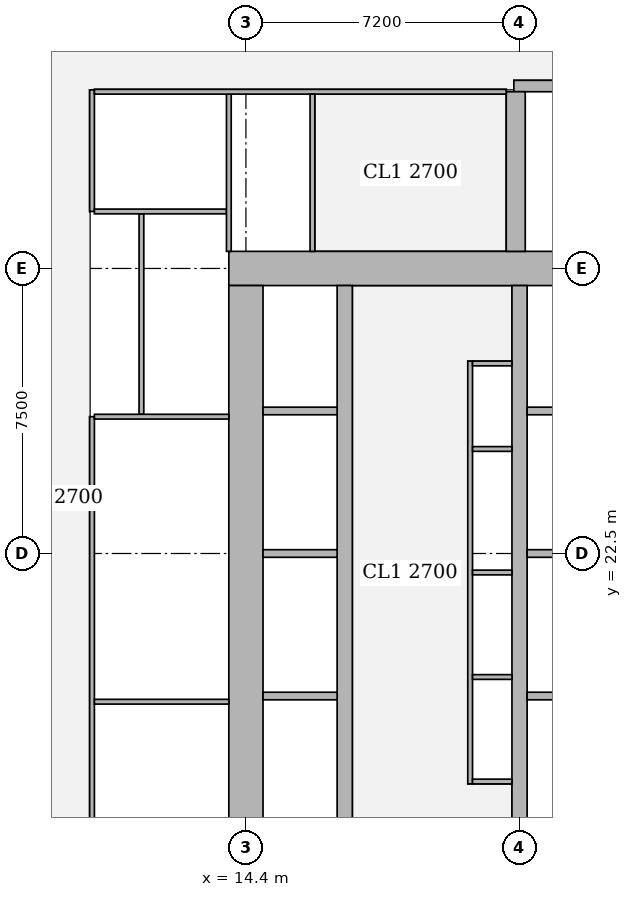
"""IFC4 building model, lengths in metres.
Left out: names, types, materials, properties, quantities, classifications, styles, units other than length and angle.
Written with IfcOpenShell. Run it as: python <this file> out.ifc"""

import sys

from ifc_helpers import new_model, si_unit, direction, frame, frame_2d, origin, place, context, subcontext, project, spatial, rectangle, extrude, element, fill, save


model = new_model("IFC4")
c1 = context("Model", 3, precision=1e-05, world=origin(), true_north=direction((0.0, 1.0)))
c2 = subcontext(c1, "Body", "Model", "MODEL_VIEW")
j1 = project(units=[si_unit("LENGTHUNIT", "METRE"), si_unit("PLANEANGLEUNIT", "RADIAN")], contexts=[c1])
p1 = place(None, origin())
s1 = spatial("IfcSite", under=j1, at=p1, CompositionType="ELEMENT")
p2 = place(p1, origin())
s2 = spatial("IfcBuilding", under=s1, at=p2, CompositionType="ELEMENT")
p3 = place(p2, frame((0.0, 0.0, 20.0)))
s3 = spatial("IfcBuildingStorey", under=s2, at=p3, CompositionType="ELEMENT", Elevation=20.0)
p4 = place(p3, frame((13.95, 30.0, 0.0), z_axis=(0.0, 0.0, 1.0), x_axis=(1.0, 0.0, 0.0)))
e1 = element("IfcWall", 1, at=p4, inside=s3, PredefinedType="SHEAR", context=c2, shape_type="SweptSolid", body=[
    extrude(rectangle(XDim=15.3, YDim=0.9, at=frame_2d((7.65, 0.0))), origin(), (0.0, 0.0, 1.0), 3.75),
])
p5 = place(p4, frame((4.45, 0.0, 0.0)))
e2 = element("IfcOpeningElement", 2, at=p5, cuts=e1, PredefinedType="OPENING", context=c2, shape_type="SweptSolid", body=[
    extrude(rectangle(XDim=1.8, YDim=2.1, at=frame_2d((0.9, 1.05))), frame((0.0, 0.46, 0.0), z_axis=(0.0, -1.0, 0.0), x_axis=(1.0, 0.0, 0.0)), (0.0, 0.0, 1.0), 0.92),
])
p6 = place(p4, frame((10.7, 0.0, 0.0)))
e3 = element("IfcOpeningElement", 3, at=p6, cuts=e1, PredefinedType="OPENING", context=c2, shape_type="SweptSolid", body=[
    extrude(rectangle(XDim=1.1, YDim=2.1, at=frame_2d((0.55, 1.05))), frame((0.0, 0.46, 0.0), z_axis=(0.0, -1.0, 0.0), x_axis=(1.0, 0.0, 0.0)), (0.0, 0.0, 1.0), 0.92),
])
p7 = place(p3, frame((14.4, 15.45, 0.0), z_axis=(0.0, 0.0, 1.0), x_axis=(0.0, 1.0, 0.0)))
e4 = element("IfcWall", 4, at=p7, inside=s3, PredefinedType="SHEAR", context=c2, shape_type="SweptSolid", body=[
    extrude(rectangle(XDim=14.1, YDim=0.9, at=frame_2d((7.05, 0.0))), origin(), (0.0, 0.0, 1.0), 3.75),
])
p8 = place(p3, frame((17.0, 15.45, 0.0), z_axis=(0.0, 0.0, 1.0), x_axis=(0.0, 1.0, 0.0)))
e5 = element("IfcWall", 5, at=p8, inside=s3, PredefinedType="SHEAR", context=c2, shape_type="SweptSolid", body=[
    extrude(rectangle(XDim=14.1, YDim=0.4, at=frame_2d((7.05, 0.0))), origin(), (0.0, 0.0, 1.0), 3.75),
])
p9 = place(p8, frame((0.875, 0.0, 0.0)))
e6 = element("IfcOpeningElement", 6, at=p9, cuts=e5, PredefinedType="OPENING", context=c2, shape_type="SweptSolid", body=[
    extrude(rectangle(XDim=1.1, YDim=2.1, at=frame_2d((0.55, 1.05))), frame((0.0, 0.21, 0.0), z_axis=(0.0, -1.0, 0.0), x_axis=(1.0, 0.0, 0.0)), (0.0, 0.0, 1.0), 0.42),
])
p10 = place(p8, frame((4.625, 0.0, 0.0)))
e7 = element("IfcOpeningElement", 7, at=p10, cuts=e5, PredefinedType="OPENING", context=c2, shape_type="SweptSolid", body=[
    extrude(rectangle(XDim=1.1, YDim=2.1, at=frame_2d((0.55, 1.05))), frame((0.0, 0.21, 0.0), z_axis=(0.0, -1.0, 0.0), x_axis=(1.0, 0.0, 0.0)), (0.0, 0.0, 1.0), 0.42),
])
p11 = place(p8, frame((8.375, 0.0, 0.0)))
e8 = element("IfcOpeningElement", 8, at=p11, cuts=e5, PredefinedType="OPENING", context=c2, shape_type="SweptSolid", body=[
    extrude(rectangle(XDim=1.1, YDim=2.1, at=frame_2d((0.55, 1.05))), frame((0.0, 0.21, 0.0), z_axis=(0.0, -1.0, 0.0), x_axis=(1.0, 0.0, 0.0)), (0.0, 0.0, 1.0), 0.42),
])
p12 = place(p8, frame((12.125, 0.0, 0.0)))
e9 = element("IfcOpeningElement", 9, at=p12, cuts=e5, PredefinedType="OPENING", context=c2, shape_type="SweptSolid", body=[
    extrude(rectangle(XDim=1.1, YDim=2.1, at=frame_2d((0.55, 1.05))), frame((0.0, 0.21, 0.0), z_axis=(0.0, -1.0, 0.0), x_axis=(1.0, 0.0, 0.0)), (0.0, 0.0, 1.0), 0.42),
])
p13 = place(p3, frame((21.6, 15.45, 0.0), z_axis=(0.0, 0.0, 1.0), x_axis=(0.0, 1.0, 0.0)))
e10 = element("IfcWall", 10, at=p13, inside=s3, PredefinedType="SHEAR", context=c2, shape_type="SweptSolid", body=[
    extrude(rectangle(XDim=14.1, YDim=0.4, at=frame_2d((7.05, 0.0))), origin(), (0.0, 0.0, 1.0), 3.75),
])
p14 = place(p3, frame((21.45, 34.8, 0.0), z_axis=(0.0, 0.0, 1.0), x_axis=(1.0, 0.0, 0.0)))
e11 = element("IfcWall", 11, at=p14, inside=s3, PredefinedType="SHEAR", context=c2, shape_type="SweptSolid", body=[
    extrude(rectangle(XDim=7.5, YDim=0.3, at=frame_2d((3.75, 0.0))), origin(), (0.0, 0.0, 1.0), 3.75),
])
p15 = place(p14, frame((0.5, 0.0, 0.0)))
e12 = element("IfcOpeningElement", 12, at=p15, cuts=e11, PredefinedType="OPENING", context=c2, shape_type="SweptSolid", body=[
    extrude(rectangle(XDim=1.1, YDim=2.1, at=frame_2d((0.55, 1.05))), frame((0.0, 0.16, 0.0), z_axis=(0.0, -1.0, 0.0), x_axis=(1.0, 0.0, 0.0)), (0.0, 0.0, 1.0), 0.32),
])
p16 = place(p3, frame((21.5, 30.45, 0.0), z_axis=(0.0, 0.0, 1.0), x_axis=(0.0, 1.0, 0.0)))
e13 = element("IfcWall", 13, at=p16, inside=s3, PredefinedType="SHEAR", context=c2, shape_type="SweptSolid", body=[
    extrude(rectangle(XDim=4.2, YDim=0.5, at=frame_2d((2.1, 0.0))), origin(), (0.0, 0.0, 1.0), 3.75),
])
p17 = place(p3, frame((10.35, 10.3, 0.0), z_axis=(0.0, 0.0, 1.0), x_axis=(0.0, 1.0, 0.0)))
e14 = element("IfcWall", 14, at=p17, inside=s3, PredefinedType="PARTITIONING", context=c2, shape_type="SweptSolid", body=[
    extrude(rectangle(XDim=15.8, YDim=0.125, at=frame_2d((7.9, 0.0))), origin(), (0.0, 0.0, 1.0), 3.5),
])
p18 = place(p17, frame((1.55, 0.0, 0.0)))
e15 = element("IfcOpeningElement", 15, at=p18, cuts=e14, PredefinedType="OPENING", context=c2, shape_type="SweptSolid", body=[
    extrude(rectangle(XDim=1.0, YDim=2.1, at=frame_2d((0.5, 1.05))), frame((0.0, 0.073, 0.0), z_axis=(0.0, -1.0, 0.0), x_axis=(1.0, 0.0, 0.0)), (0.0, 0.0, 1.0), 0.145),
])
p19 = place(p17, frame((5.7, 0.0, 0.0)))
e16 = element("IfcOpeningElement", 16, at=p19, cuts=e14, PredefinedType="OPENING", context=c2, shape_type="SweptSolid", body=[
    extrude(rectangle(XDim=1.0, YDim=2.1, at=frame_2d((0.5, 1.05))), frame((0.0, 0.073, 0.0), z_axis=(0.0, -1.0, 0.0), x_axis=(1.0, 0.0, 0.0)), (0.0, 0.0, 1.0), 0.145),
])
p20 = place(p17, frame((11.55, 0.0, 0.0)))
e17 = element("IfcOpeningElement", 17, at=p20, cuts=e14, PredefinedType="OPENING", context=c2, shape_type="SweptSolid", body=[
    extrude(rectangle(XDim=1.0, YDim=2.1, at=frame_2d((0.5, 1.05))), frame((0.0, 0.073, 0.0), z_axis=(0.0, -1.0, 0.0), x_axis=(1.0, 0.0, 0.0)), (0.0, 0.0, 1.0), 0.145),
])
p21 = place(p3, frame((10.35, 31.5, 0.0), z_axis=(0.0, 0.0, 1.0), x_axis=(0.0, 1.0, 0.0)))
e18 = element("IfcWall", 18, at=p21, inside=s3, PredefinedType="PARTITIONING", context=c2, shape_type="SweptSolid", body=[
    extrude(rectangle(XDim=3.2, YDim=0.125, at=frame_2d((1.6, 0.0))), origin(), (0.0, 0.0, 1.0), 3.5),
])
p22 = place(p21, frame((1.1, 0.0, 0.0)))
e19 = element("IfcOpeningElement", 19, at=p22, cuts=e18, PredefinedType="OPENING", context=c2, shape_type="SweptSolid", body=[
    extrude(rectangle(XDim=1.0, YDim=2.1, at=frame_2d((0.5, 1.05))), frame((0.0, 0.073, 0.0), z_axis=(0.0, -1.0, 0.0), x_axis=(1.0, 0.0, 0.0)), (0.0, 0.0, 1.0), 0.145),
])
p23 = place(p3, frame((11.65, 26.163, 0.0), z_axis=(0.0, 0.0, 1.0), x_axis=(0.0, 1.0, 0.0)))
e20 = element("IfcWall", 20, at=p23, inside=s3, PredefinedType="PARTITIONING", context=c2, shape_type="SweptSolid", body=[
    extrude(rectangle(XDim=5.275, YDim=0.125, at=frame_2d((2.637, 0.0))), origin(), (0.0, 0.0, 1.0), 3.5),
])
p24 = place(p23, frame((2.137, 0.0, 0.0)))
e21 = element("IfcOpeningElement", 21, at=p24, cuts=e20, PredefinedType="OPENING", context=c2, shape_type="SweptSolid", body=[
    extrude(rectangle(XDim=1.0, YDim=2.1, at=frame_2d((0.5, 1.05))), frame((0.0, 0.073, 0.0), z_axis=(0.0, -1.0, 0.0), x_axis=(1.0, 0.0, 0.0)), (0.0, 0.0, 1.0), 0.145),
])
for number, where, z_axis, x_axis in (
    (22, (10.413, 18.6, 0.0), (0.0, 0.0, 1.0), (1.0, 0.0, 0.0)),
    (23, (10.413, 26.1, 0.0), (0.0, 0.0, 1.0), (1.0, 0.0, 0.0)),
):
    element("IfcWall", number, at=place(p3, frame(where, z_axis=z_axis, x_axis=x_axis)), inside=s3, PredefinedType="PARTITIONING", context=c2, shape_type="SweptSolid", body=[
        extrude(rectangle(XDim=3.537, YDim=0.125, at=frame_2d((1.769, 0.0))), origin(), (0.0, 0.0, 1.0), 3.5),
    ])
p25 = place(p3, frame((10.413, 31.5, 0.0), z_axis=(0.0, 0.0, 1.0), x_axis=(1.0, 0.0, 0.0)))
e24 = element("IfcWall", 24, at=p25, inside=s3, PredefinedType="PARTITIONING", context=c2, shape_type="SweptSolid", body=[
    extrude(rectangle(XDim=3.475, YDim=0.125, at=frame_2d((1.737, 0.0))), origin(), (0.0, 0.0, 1.0), 3.5),
])
p26 = place(p3, frame((13.95, 30.45, 0.0), z_axis=(0.0, 0.0, 1.0), x_axis=(0.0, 1.0, 0.0)))
e25 = element("IfcWall", 25, at=p26, inside=s3, PredefinedType="PARTITIONING", context=c2, shape_type="SweptSolid", body=[
    extrude(rectangle(XDim=4.137, YDim=0.125, at=frame_2d((2.068, 0.0))), origin(), (0.0, 0.0, 1.0), 3.5),
])
p27 = place(p3, frame((10.413, 34.65, 0.0), z_axis=(0.0, 0.0, 1.0), x_axis=(1.0, 0.0, 0.0)))
e26 = element("IfcWall", 26, at=p27, inside=s3, PredefinedType="PARTITIONING", context=c2, shape_type="SweptSolid", body=[
    extrude(rectangle(XDim=10.837, YDim=0.125, at=frame_2d((5.418, 0.0))), origin(), (0.0, 0.0, 1.0), 3.5),
])
p28 = place(p27, frame((7.487, 0.0, 0.0)))
e27 = element("IfcOpeningElement", 27, at=p28, cuts=e26, PredefinedType="OPENING", context=c2, shape_type="SweptSolid", body=[
    extrude(rectangle(XDim=1.8, YDim=2.1, at=frame_2d((0.9, 1.05))), frame((0.0, 0.073, 0.0), z_axis=(0.0, -1.0, 0.0), x_axis=(1.0, 0.0, 0.0)), (0.0, 0.0, 1.0), 0.145),
])
p29 = place(p3, frame((16.15, 30.45, 0.0), z_axis=(0.0, 0.0, 1.0), x_axis=(0.0, 1.0, 0.0)))
e28 = element("IfcWall", 28, at=p29, inside=s3, PredefinedType="PARTITIONING", context=c2, shape_type="SweptSolid", body=[
    extrude(rectangle(XDim=4.137, YDim=0.125, at=frame_2d((2.068, 0.0))), origin(), (0.0, 0.0, 1.0), 3.5),
])
p30 = place(p29, frame((1.625, 0.0, 0.0)))
e29 = element("IfcOpeningElement", 29, at=p30, cuts=e28, PredefinedType="OPENING", context=c2, shape_type="SweptSolid", body=[
    extrude(rectangle(XDim=1.0, YDim=2.1, at=frame_2d((0.5, 1.05))), frame((0.0, 0.073, 0.0), z_axis=(0.0, -1.0, 0.0), x_axis=(1.0, 0.0, 0.0)), (0.0, 0.0, 1.0), 0.145),
])
p31 = place(p3, frame((20.3, 16.438, 0.0), z_axis=(0.0, 0.0, 1.0), x_axis=(0.0, 1.0, 0.0)))
e30 = element("IfcWall", 30, at=p31, inside=s3, PredefinedType="PARTITIONING", context=c2, shape_type="SweptSolid", body=[
    extrude(rectangle(XDim=11.124, YDim=0.125, at=frame_2d((5.562, 0.0))), origin(), (0.0, 0.0, 1.0), 3.5),
])
p32 = place(p31, frame((0.937, 0.0, 0.0)))
e31 = element("IfcOpeningElement", 31, at=p32, cuts=e30, PredefinedType="OPENING", context=c2, shape_type="SweptSolid", body=[
    extrude(rectangle(XDim=1.0, YDim=2.1, at=frame_2d((0.5, 1.05))), frame((0.0, 0.073, 0.0), z_axis=(0.0, -1.0, 0.0), x_axis=(1.0, 0.0, 0.0)), (0.0, 0.0, 1.0), 0.145),
])
p33 = place(p31, frame((3.687, 0.0, 0.0)))
e32 = element("IfcOpeningElement", 32, at=p33, cuts=e30, PredefinedType="OPENING", context=c2, shape_type="SweptSolid", body=[
    extrude(rectangle(XDim=1.0, YDim=2.1, at=frame_2d((0.5, 1.05))), frame((0.0, 0.073, 0.0), z_axis=(0.0, -1.0, 0.0), x_axis=(1.0, 0.0, 0.0)), (0.0, 0.0, 1.0), 0.145),
])
p34 = place(p31, frame((6.687, 0.0, 0.0)))
e33 = element("IfcOpeningElement", 33, at=p34, cuts=e30, PredefinedType="OPENING", context=c2, shape_type="SweptSolid", body=[
    extrude(rectangle(XDim=1.0, YDim=2.1, at=frame_2d((0.5, 1.05))), frame((0.0, 0.073, 0.0), z_axis=(0.0, -1.0, 0.0), x_axis=(1.0, 0.0, 0.0)), (0.0, 0.0, 1.0), 0.145),
])
p35 = place(p31, frame((9.437, 0.0, 0.0)))
e34 = element("IfcOpeningElement", 34, at=p35, cuts=e30, PredefinedType="OPENING", context=c2, shape_type="SweptSolid", body=[
    extrude(rectangle(XDim=1.0, YDim=2.1, at=frame_2d((0.5, 1.05))), frame((0.0, 0.073, 0.0), z_axis=(0.0, -1.0, 0.0), x_axis=(1.0, 0.0, 0.0)), (0.0, 0.0, 1.0), 0.145),
])
for number, where, z_axis, x_axis in (
    (35, (20.363, 16.5, 0.0), (0.0, 0.0, 1.0), (1.0, 0.0, 0.0)),
    (36, (20.363, 27.5, 0.0), (0.0, 0.0, 1.0), (1.0, 0.0, 0.0)),
    (37, (20.363, 19.25, 0.0), (0.0, 0.0, 1.0), (1.0, 0.0, 0.0)),
    (38, (20.363, 22.0, 0.0), (0.0, 0.0, 1.0), (1.0, 0.0, 0.0)),
    (39, (20.363, 25.25, 0.0), (0.0, 0.0, 1.0), (1.0, 0.0, 0.0)),
):
    element("IfcWall", number, at=place(p3, frame(where, z_axis=z_axis, x_axis=x_axis)), inside=s3, PredefinedType="PARTITIONING", context=c2, shape_type="SweptSolid", body=[
        extrude(rectangle(XDim=1.037, YDim=0.125, at=frame_2d((0.519, 0.0))), origin(), (0.0, 0.0, 1.0), 3.5),
    ])
p36 = place(p3, frame((14.85, 18.75, 0.0), z_axis=(0.0, 0.0, 1.0), x_axis=(1.0, 0.0, 0.0)))
e40 = element("IfcWall", 40, at=p36, inside=s3, PredefinedType="SOLIDWALL", context=c2, shape_type="SweptSolid", body=[
    extrude(rectangle(XDim=1.95, YDim=0.2, at=frame_2d((0.975, 0.0))), origin(), (0.0, 0.0, 1.0), 3.5),
])
p37 = place(p3, frame((21.8, 18.75, 0.0), z_axis=(0.0, 0.0, 1.0), x_axis=(1.0, 0.0, 0.0)))
e41 = element("IfcWall", 41, at=p37, inside=s3, PredefinedType="SOLIDWALL", context=c2, shape_type="SweptSolid", body=[
    extrude(rectangle(XDim=2.2, YDim=0.2, at=frame_2d((1.1, 0.0))), origin(), (0.0, 0.0, 1.0), 3.5),
])
p38 = place(p3, frame((14.85, 22.5, 0.0), z_axis=(0.0, 0.0, 1.0), x_axis=(1.0, 0.0, 0.0)))
e42 = element("IfcWall", 42, at=p38, inside=s3, PredefinedType="SOLIDWALL", context=c2, shape_type="SweptSolid", body=[
    extrude(rectangle(XDim=1.95, YDim=0.2, at=frame_2d((0.975, 0.0))), origin(), (0.0, 0.0, 1.0), 3.5),
])
p39 = place(p3, frame((21.8, 22.5, 0.0), z_axis=(0.0, 0.0, 1.0), x_axis=(1.0, 0.0, 0.0)))
e43 = element("IfcWall", 43, at=p39, inside=s3, PredefinedType="SOLIDWALL", context=c2, shape_type="SweptSolid", body=[
    extrude(rectangle(XDim=2.2, YDim=0.2, at=frame_2d((1.1, 0.0))), origin(), (0.0, 0.0, 1.0), 3.5),
])
p40 = place(p3, frame((14.85, 26.25, 0.0), z_axis=(0.0, 0.0, 1.0), x_axis=(1.0, 0.0, 0.0)))
e44 = element("IfcWall", 44, at=p40, inside=s3, PredefinedType="SOLIDWALL", context=c2, shape_type="SweptSolid", body=[
    extrude(rectangle(XDim=1.95, YDim=0.2, at=frame_2d((0.975, 0.0))), origin(), (0.0, 0.0, 1.0), 3.5),
])
p41 = place(p3, frame((21.8, 26.25, 0.0), z_axis=(0.0, 0.0, 1.0), x_axis=(1.0, 0.0, 0.0)))
e45 = element("IfcWall", 45, at=p41, inside=s3, PredefinedType="SOLIDWALL", context=c2, shape_type="SweptSolid", body=[
    extrude(rectangle(XDim=2.2, YDim=0.2, at=frame_2d((1.1, 0.0))), origin(), (0.0, 0.0, 1.0), 3.5),
])
p42 = place(p19, origin())
e46 = element("IfcDoor", 46, at=p42, inside=s3, OperationType="SINGLE_SWING_LEFT", PredefinedType="DOOR", context=c2, shape_type="SweptSolid", body=[
    extrude(rectangle(XDim=1.0, YDim=2.1, at=frame_2d((0.5, 1.05))), frame((0.0, 0.025, 0.0), z_axis=(0.0, -1.0, 0.0), x_axis=(1.0, 0.0, 0.0)), (0.0, 0.0, 1.0), 0.05),
])
fill(e16, e46)
p43 = place(p20, origin())
e47 = element("IfcDoor", 47, at=p43, inside=s3, OperationType="SINGLE_SWING_LEFT", PredefinedType="DOOR", context=c2, shape_type="SweptSolid", body=[
    extrude(rectangle(XDim=1.0, YDim=2.1, at=frame_2d((0.5, 1.05))), frame((0.0, 0.025, 0.0), z_axis=(0.0, -1.0, 0.0), x_axis=(1.0, 0.0, 0.0)), (0.0, 0.0, 1.0), 0.05),
])
fill(e17, e47)
p44 = place(p24, origin())
e48 = element("IfcDoor", 48, at=p44, inside=s3, OperationType="SINGLE_SWING_LEFT", PredefinedType="DOOR", context=c2, shape_type="SweptSolid", body=[
    extrude(rectangle(XDim=1.0, YDim=2.1, at=frame_2d((0.5, 1.05))), frame((0.0, 0.025, 0.0), z_axis=(0.0, -1.0, 0.0), x_axis=(1.0, 0.0, 0.0)), (0.0, 0.0, 1.0), 0.05),
])
fill(e21, e48)
p45 = place(p22, origin())
e49 = element("IfcDoor", 49, at=p45, inside=s3, OperationType="SINGLE_SWING_RIGHT", PredefinedType="DOOR", context=c2, shape_type="SweptSolid", body=[
    extrude(rectangle(XDim=1.0, YDim=2.1, at=frame_2d((0.5, 1.05))), frame((0.0, 0.025, 0.0), z_axis=(0.0, -1.0, 0.0), x_axis=(1.0, 0.0, 0.0)), (0.0, 0.0, 1.0), 0.05),
])
fill(e19, e49)
p46 = place(p30, origin())
e50 = element("IfcDoor", 50, at=p46, inside=s3, OperationType="SINGLE_SWING_RIGHT", PredefinedType="DOOR", context=c2, shape_type="SweptSolid", body=[
    extrude(rectangle(XDim=1.0, YDim=2.1, at=frame_2d((0.5, 1.05))), frame((0.0, 0.025, 0.0), z_axis=(0.0, -1.0, 0.0), x_axis=(1.0, 0.0, 0.0)), (0.0, 0.0, 1.0), 0.05),
])
fill(e29, e50)
p47 = place(p28, origin())
e51 = element("IfcDoor", 51, at=p47, inside=s3, OperationType="DOUBLE_DOOR_SINGLE_SWING", PredefinedType="DOOR", context=c2, shape_type="SweptSolid", body=[
    extrude(rectangle(XDim=1.8, YDim=2.1, at=frame_2d((0.9, 1.05))), frame((0.0, 0.025, 0.0), z_axis=(0.0, -1.0, 0.0), x_axis=(1.0, 0.0, 0.0)), (0.0, 0.0, 1.0), 0.05),
])
fill(e27, e51)
p48 = place(p32, origin())
e52 = element("IfcDoor", 52, at=p48, inside=s3, OperationType="SINGLE_SWING_RIGHT", PredefinedType="DOOR", context=c2, shape_type="SweptSolid", body=[
    extrude(rectangle(XDim=1.0, YDim=2.1, at=frame_2d((0.5, 1.05))), frame((0.0, 0.025, 0.0), z_axis=(0.0, -1.0, 0.0), x_axis=(1.0, 0.0, 0.0)), (0.0, 0.0, 1.0), 0.05),
])
fill(e31, e52)
p49 = place(p33, origin())
e53 = element("IfcDoor", 53, at=p49, inside=s3, OperationType="SINGLE_SWING_LEFT", PredefinedType="DOOR", context=c2, shape_type="SweptSolid", body=[
    extrude(rectangle(XDim=1.0, YDim=2.1, at=frame_2d((0.5, 1.05))), frame((0.0, 0.025, 0.0), z_axis=(0.0, -1.0, 0.0), x_axis=(1.0, 0.0, 0.0)), (0.0, 0.0, 1.0), 0.05),
])
fill(e32, e53)
p50 = place(p34, origin())
e54 = element("IfcDoor", 54, at=p50, inside=s3, OperationType="SINGLE_SWING_LEFT", PredefinedType="DOOR", context=c2, shape_type="SweptSolid", body=[
    extrude(rectangle(XDim=1.0, YDim=2.1, at=frame_2d((0.5, 1.05))), frame((0.0, 0.025, 0.0), z_axis=(0.0, -1.0, 0.0), x_axis=(1.0, 0.0, 0.0)), (0.0, 0.0, 1.0), 0.05),
])
fill(e33, e54)
p51 = place(p35, origin())
e55 = element("IfcDoor", 55, at=p51, inside=s3, OperationType="SINGLE_SWING_LEFT", PredefinedType="DOOR", context=c2, shape_type="SweptSolid", body=[
    extrude(rectangle(XDim=1.0, YDim=2.1, at=frame_2d((0.5, 1.05))), frame((0.0, 0.025, 0.0), z_axis=(0.0, -1.0, 0.0), x_axis=(1.0, 0.0, 0.0)), (0.0, 0.0, 1.0), 0.05),
])
fill(e34, e55)
p52 = place(p5, origin())
e56 = element("IfcDoor", 56, at=p52, inside=s3, OperationType="DOUBLE_DOOR_SINGLE_SWING", PredefinedType="DOOR", context=c2, shape_type="SweptSolid", body=[
    extrude(rectangle(XDim=1.8, YDim=2.1, at=frame_2d((0.9, 1.05))), frame((0.0, 0.025, 0.0), z_axis=(0.0, -1.0, 0.0), x_axis=(1.0, 0.0, 0.0)), (0.0, 0.0, 1.0), 0.05),
])
fill(e2, e56)
p53 = place(p9, origin())
e57 = element("IfcDoor", 57, at=p53, inside=s3, OperationType="DOUBLE_DOOR_SLIDING", PredefinedType="DOOR", context=c2, shape_type="SweptSolid", body=[
    extrude(rectangle(XDim=1.1, YDim=2.1, at=frame_2d((0.55, 1.05))), frame((0.0, 0.025, 0.0), z_axis=(0.0, -1.0, 0.0), x_axis=(1.0, 0.0, 0.0)), (0.0, 0.0, 1.0), 0.05),
])
fill(e6, e57)
p54 = place(p10, origin())
e58 = element("IfcDoor", 58, at=p54, inside=s3, OperationType="DOUBLE_DOOR_SLIDING", PredefinedType="DOOR", context=c2, shape_type="SweptSolid", body=[
    extrude(rectangle(XDim=1.1, YDim=2.1, at=frame_2d((0.55, 1.05))), frame((0.0, 0.025, 0.0), z_axis=(0.0, -1.0, 0.0), x_axis=(1.0, 0.0, 0.0)), (0.0, 0.0, 1.0), 0.05),
])
fill(e7, e58)
p55 = place(p11, origin())
e59 = element("IfcDoor", 59, at=p55, inside=s3, OperationType="DOUBLE_DOOR_SLIDING", PredefinedType="DOOR", context=c2, shape_type="SweptSolid", body=[
    extrude(rectangle(XDim=1.1, YDim=2.1, at=frame_2d((0.55, 1.05))), frame((0.0, 0.025, 0.0), z_axis=(0.0, -1.0, 0.0), x_axis=(1.0, 0.0, 0.0)), (0.0, 0.0, 1.0), 0.05),
])
fill(e8, e59)
p56 = place(p12, origin())
e60 = element("IfcDoor", 60, at=p56, inside=s3, OperationType="DOUBLE_DOOR_SLIDING", PredefinedType="DOOR", context=c2, shape_type="SweptSolid", body=[
    extrude(rectangle(XDim=1.1, YDim=2.1, at=frame_2d((0.55, 1.05))), frame((0.0, 0.025, 0.0), z_axis=(0.0, -1.0, 0.0), x_axis=(1.0, 0.0, 0.0)), (0.0, 0.0, 1.0), 0.05),
])
fill(e9, e60)
p57 = place(p15, origin())
e61 = element("IfcDoor", 61, at=p57, inside=s3, OperationType="SINGLE_SWING_RIGHT", PredefinedType="DOOR", context=c2, shape_type="SweptSolid", body=[
    extrude(rectangle(XDim=1.1, YDim=2.1, at=frame_2d((0.55, 1.05))), frame((0.0, 0.025, 0.0), z_axis=(0.0, -1.0, 0.0), x_axis=(1.0, 0.0, 0.0)), (0.0, 0.0, 1.0), 0.05),
])
fill(e12, e61)
save(model, sys.argv[1])
